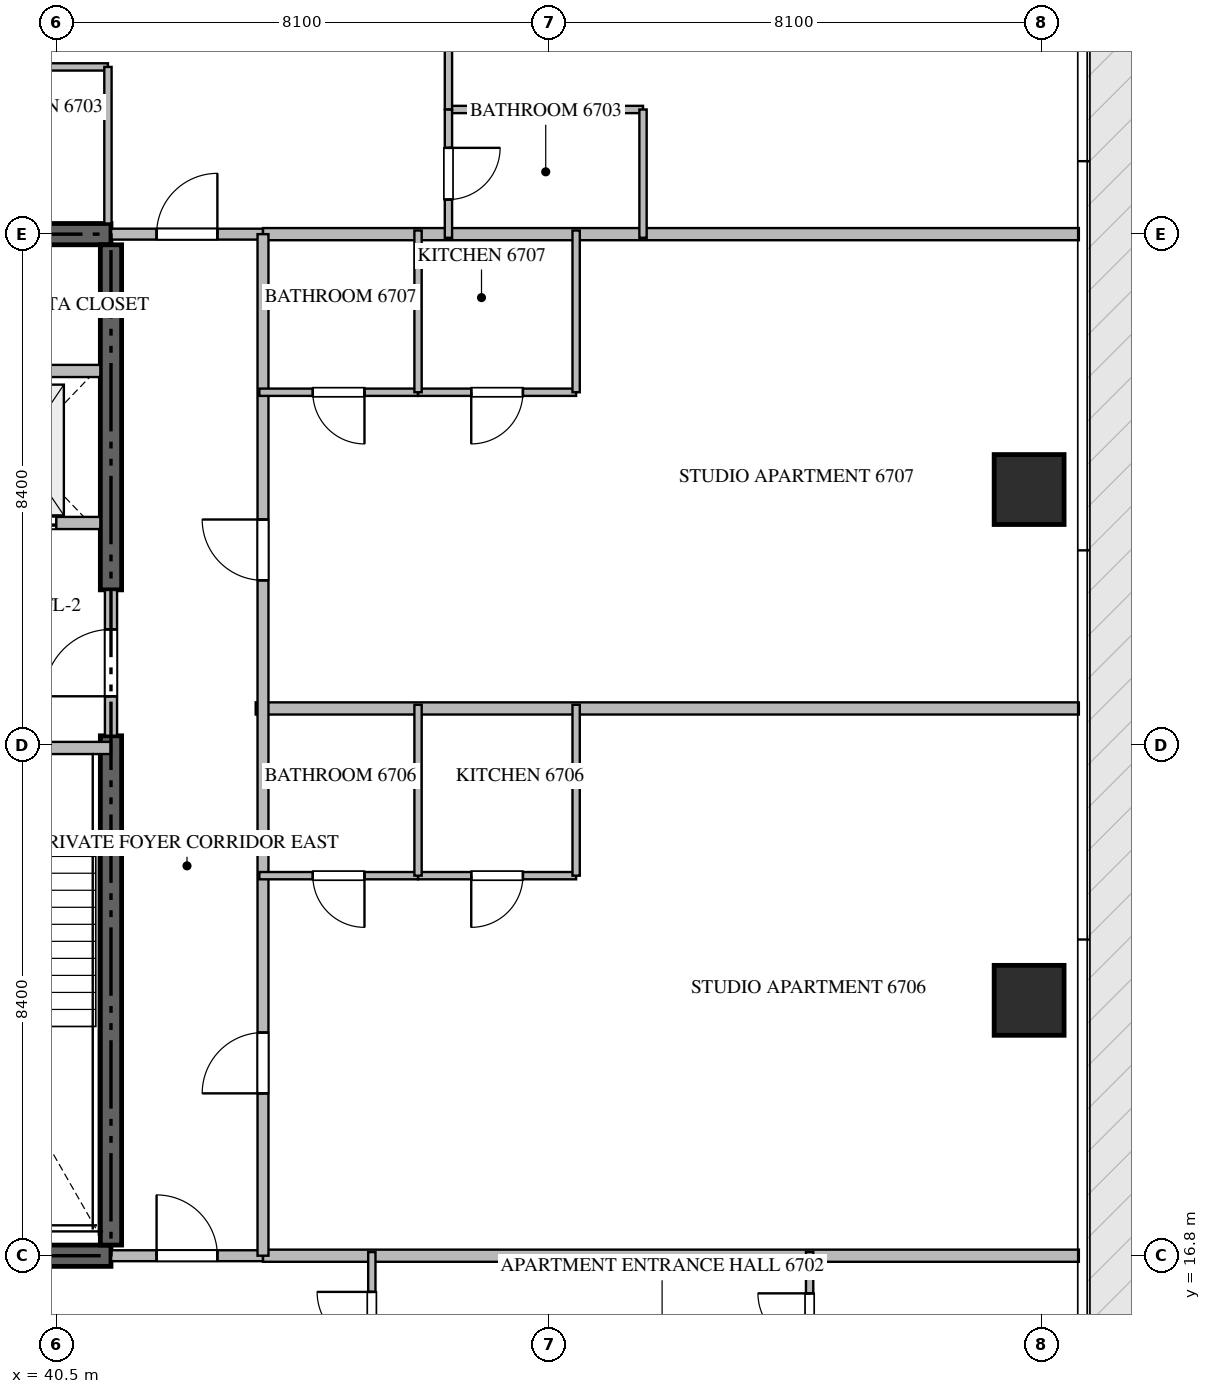
"""IFC4 building model, lengths in metres.
Left out: names, types, materials, properties, quantities, classifications, styles, units other than length and angle.
Written with IfcOpenShell. Run it as: python <this file> out.ifc"""

import sys

from ifc_helpers import new_model, si_unit, direction, frame, frame_2d, origin, origin_2d, place, context, subcontext, project, spatial, rectangle, extrude, source, transform, mapped, element, fill, save


model = new_model("IFC4")
c1 = context("Model", 3, precision=1e-05, world=origin(), true_north=direction((0.0, 1.0)))
c2 = subcontext(c1, "Body", "Model", "MODEL_VIEW")
j1 = project(units=[si_unit("LENGTHUNIT", "METRE"), si_unit("PLANEANGLEUNIT", "RADIAN")], contexts=[c1])
p1 = place(None, origin())
s1 = spatial("IfcSite", under=j1, at=p1, CompositionType="ELEMENT")
p2 = place(p1, origin())
s2 = spatial("IfcBuilding", under=s1, at=p2, CompositionType="ELEMENT")
p3 = place(p2, frame((0.0, 0.0, 268.2)))
s3 = spatial("IfcBuildingStorey", under=s2, at=p3, CompositionType="ELEMENT", Elevation=268.2)
for number, where, z_axis, x_axis in (
    (1, (23.4, 16.8, -0.26), (0.0, 0.0, 1.0), (1.0, 0.0, 0.0)),
    (2, (41.4, 33.6, -0.26), (0.0, 0.0, 1.0), (-1.0, 0.0, 0.0)),
):
    element("IfcWall", number, at=place(p3, frame(where, z_axis=z_axis, x_axis=x_axis)), inside=s3, PredefinedType="SHEAR", context=c2, shape_type="SweptSolid", body=[
        extrude(rectangle(XDim=18.0, YDim=0.35, at=frame_2d((9.0, 0.0))), origin(), (0.0, 0.0, 1.0), 3.848),
    ])
p4 = place(p3, frame((41.4, 16.975, -0.26), z_axis=(0.0, 0.0, 1.0), x_axis=(0.0, 1.0, 0.0)))
e3 = element("IfcWall", 3, at=p4, inside=s3, PredefinedType="SHEAR", context=c2, shape_type="SweptSolid", body=[
    extrude(rectangle(XDim=8.375, YDim=0.35, at=frame_2d((4.188, 0.0))), origin(), (0.0, 0.0, 1.0), 3.848),
])
p5 = place(p3, frame((41.4, 27.75, -0.26), z_axis=(0.0, 0.0, 1.0), x_axis=(0.0, 1.0, 0.0)))
e4 = element("IfcWall", 4, at=p5, inside=s3, PredefinedType="SHEAR", context=c2, shape_type="SweptSolid", body=[
    extrude(rectangle(XDim=5.675, YDim=0.35, at=frame_2d((2.837, 0.0))), origin(), (0.0, 0.0, 1.0), 3.848),
])
m1 = source(origin(), c2, "Body", "SweptSolid", [
    extrude(rectangle(XDim=1.15, YDim=1.15, at=origin_2d()), origin(), (0.0, 0.0, 1.0), 3.85),
])
for number, where, z_axis, x_axis in (
    (5, (56.5, 21.0, -0.26), (0.0, 0.0, 1.0), (1.0, 0.0, 0.0)),
    (6, (56.5, 29.4, -0.26), (0.0, 0.0, 1.0), (1.0, 0.0, 0.0)),
):
    element("IfcColumn", number, at=place(p3, frame(where, z_axis=z_axis, x_axis=x_axis)), inside=s3, PredefinedType="COLUMN", context=c2, shape_type="MappedRepresentation", body=[
        mapped(m1, transform((0.0, 0.0, 0.0), scale=1.0)),
    ])
p6 = place(p3, frame((36.95, 25.15, 0.0), z_axis=(0.0, 0.0, 1.0), x_axis=(1.0, 0.0, 0.0)))
e7 = element("IfcWall", 7, at=p6, inside=s3, PredefinedType="STANDARD", context=c2, shape_type="SweptSolid", body=[
    extrude(rectangle(XDim=4.45, YDim=0.2, at=frame_2d((2.225, 0.0))), origin(), (0.0, 0.0, 1.0), 3.59),
])
p7 = place(p6, frame((1.65, 0.0, 0.0)))
e8 = element("IfcOpeningElement", 8, at=p7, cuts=e7, PredefinedType="OPENING", context=c2, shape_type="SweptSolid", body=[
    extrude(rectangle(XDim=1.1, YDim=2.15, at=frame_2d((0.55, 1.075))), frame((0.0, 0.11, 0.0), z_axis=(0.0, -1.0, 0.0), x_axis=(1.0, 0.0, 0.0)), (0.0, 0.0, 1.0), 0.22),
])
p8 = place(p3, frame((38.75, 28.85, 0.0), z_axis=(0.0, 0.0, 1.0), x_axis=(1.0, 0.0, 0.0)))
e9 = element("IfcWall", 9, at=p8, inside=s3, PredefinedType="STANDARD", context=c2, shape_type="SweptSolid", body=[
    extrude(rectangle(XDim=2.475, YDim=0.2, at=frame_2d((1.238, 0.0))), origin(), (0.0, 0.0, 1.0), 3.59),
])
p9 = place(p8, frame((0.55, 0.0, 0.0)))
e10 = element("IfcOpeningElement", 10, at=p9, cuts=e9, PredefinedType="OPENING", context=c2, shape_type="SweptSolid", body=[
    extrude(rectangle(XDim=1.2, YDim=2.2, at=frame_2d((0.6, 1.1))), frame((0.0, 0.11, 0.0), z_axis=(0.0, -1.0, 0.0), x_axis=(1.0, 0.0, 0.0)), (0.0, 0.0, 1.0), 0.22),
])
p10 = place(p3, frame((38.75, 31.35, 0.0), z_axis=(0.0, 0.0, 1.0), x_axis=(1.0, 0.0, 0.0)))
e11 = element("IfcWall", 11, at=p10, inside=s3, PredefinedType="STANDARD", context=c2, shape_type="SweptSolid", body=[
    extrude(rectangle(XDim=2.475, YDim=0.2, at=frame_2d((1.238, 0.0))), origin(), (0.0, 0.0, 1.0), 3.59),
])
p11 = place(p3, frame((41.4, 25.352, 0.0), z_axis=(0.0, 0.0, 1.0), x_axis=(0.0, 1.0, 0.0)))
e12 = element("IfcWall", 12, at=p11, inside=s3, PredefinedType="STANDARD", context=c2, shape_type="SweptSolid", body=[
    extrude(rectangle(XDim=2.396, YDim=0.2, at=frame_2d((1.198, 0.0))), origin(), (0.0, 0.0, 1.0), 3.59),
])
p12 = place(p11, frame((0.648, 0.0, 0.0)))
e13 = element("IfcOpeningElement", 13, at=p12, cuts=e12, PredefinedType="OPENING", context=c2, shape_type="SweptSolid", body=[
    extrude(rectangle(XDim=1.1, YDim=2.15, at=frame_2d((0.55, 1.075))), frame((0.0, 0.11, 0.0), z_axis=(0.0, -1.0, 0.0), x_axis=(1.0, 0.0, 0.0)), (0.0, 0.0, 1.0), 0.22),
])
p13 = place(p3, frame((43.78, 25.8, 0.0), z_axis=(0.0, 0.0, 1.0), x_axis=(1.0, 0.0, 0.0)))
e14 = element("IfcWall", 14, at=p13, inside=s3, PredefinedType="PARTITIONING", context=c2, shape_type="SweptSolid", body=[
    extrude(rectangle(XDim=13.538, YDim=0.2, at=frame_2d((6.769, 0.0))), origin(), (0.0, 0.0, 1.0), 3.59),
])
for number, where, z_axis, x_axis in (
    (15, (43.9, 16.8, 0.0), (0.0, 0.0, 1.0), (1.0, 0.0, 0.0)),
    (16, (43.9, 33.6, 0.0), (0.0, 0.0, 1.0), (1.0, 0.0, 0.0)),
):
    element("IfcWall", number, at=place(p3, frame(where, z_axis=z_axis, x_axis=x_axis)), inside=s3, PredefinedType="PARTITIONING", context=c2, shape_type="SweptSolid", body=[
        extrude(rectangle(XDim=13.418, YDim=0.2, at=frame_2d((6.709, 0.0))), origin(), (0.0, 0.0, 1.0), 3.59),
    ])
p14 = place(p3, frame((41.402, 16.8, 0.0), z_axis=(0.0, 0.0, 1.0), x_axis=(1.0, 0.0, 0.0)))
e17 = element("IfcWall", 17, at=p14, inside=s3, PredefinedType="PARTITIONING", context=c2, shape_type="SweptSolid", body=[
    extrude(rectangle(XDim=2.496, YDim=0.18, at=frame_2d((1.248, 0.0))), origin(), (0.0, 0.0, 1.0), 3.59),
])
p15 = place(p14, frame((0.748, 0.0, 0.0)))
e18 = element("IfcOpeningElement", 18, at=p15, cuts=e17, PredefinedType="OPENING", context=c2, shape_type="SweptSolid", body=[
    extrude(rectangle(XDim=1.0, YDim=2.15, at=frame_2d((0.5, 1.075))), frame((0.0, 0.1, 0.0), z_axis=(0.0, -1.0, 0.0), x_axis=(1.0, 0.0, 0.0)), (0.0, 0.0, 1.0), 0.2),
])
p16 = place(p3, frame((41.402, 33.6, 0.0), z_axis=(0.0, 0.0, 1.0), x_axis=(1.0, 0.0, 0.0)))
e19 = element("IfcWall", 19, at=p16, inside=s3, PredefinedType="PARTITIONING", context=c2, shape_type="SweptSolid", body=[
    extrude(rectangle(XDim=2.496, YDim=0.18, at=frame_2d((1.248, 0.0))), origin(), (0.0, 0.0, 1.0), 3.59),
])
p17 = place(p16, frame((0.748, 0.0, 0.0)))
e20 = element("IfcOpeningElement", 20, at=p17, cuts=e19, PredefinedType="OPENING", context=c2, shape_type="SweptSolid", body=[
    extrude(rectangle(XDim=1.0, YDim=2.15, at=frame_2d((0.5, 1.075))), frame((0.0, 0.1, 0.0), z_axis=(0.0, -1.0, 0.0), x_axis=(1.0, 0.0, 0.0)), (0.0, 0.0, 1.0), 0.2),
])
p18 = place(p3, frame((43.9, 16.8, 0.0), z_axis=(0.0, 0.0, 1.0), x_axis=(0.0, 1.0, 0.0)))
e21 = element("IfcWall", 21, at=p18, inside=s3, PredefinedType="PARTITIONING", context=c2, shape_type="SweptSolid", body=[
    extrude(rectangle(XDim=16.8, YDim=0.18, at=frame_2d((8.4, 0.0))), origin(), (0.0, 0.0, 1.0), 3.59),
])
p19 = place(p18, frame((2.67, 0.0, 0.0)))
e22 = element("IfcOpeningElement", 22, at=p19, cuts=e21, PredefinedType="OPENING", context=c2, shape_type="SweptSolid", body=[
    extrude(rectangle(XDim=1.0, YDim=2.15, at=frame_2d((0.5, 1.075))), frame((0.0, 0.1, 0.0), z_axis=(0.0, -1.0, 0.0), x_axis=(1.0, 0.0, 0.0)), (0.0, 0.0, 1.0), 0.2),
])
p20 = place(p18, frame((11.107, 0.0, 0.0)))
e23 = element("IfcOpeningElement", 23, at=p20, cuts=e21, PredefinedType="OPENING", context=c2, shape_type="SweptSolid", body=[
    extrude(rectangle(XDim=1.0, YDim=2.15, at=frame_2d((0.5, 1.075))), frame((0.0, 0.1, 0.0), z_axis=(0.0, -1.0, 0.0), x_axis=(1.0, 0.0, 0.0)), (0.0, 0.0, 1.0), 0.2),
])
p21 = place(p3, frame((45.69, 14.65, 0.0), z_axis=(0.0, 0.0, 1.0), x_axis=(0.0, 1.0, 0.0)))
e24 = element("IfcWall", 24, at=p21, inside=s3, PredefinedType="PARTITIONING", context=c2, shape_type="SweptSolid", body=[
    extrude(rectangle(XDim=2.21, YDim=0.12, at=frame_2d((1.105, 0.0))), origin(), (0.0, 0.0, 1.0), 3.59),
])
p22 = place(p21, frame((0.655, 0.0, 0.0)))
e25 = element("IfcOpeningElement", 25, at=p22, cuts=e24, PredefinedType="OPENING", context=c2, shape_type="SweptSolid", body=[
    extrude(rectangle(XDim=0.9, YDim=2.1, at=frame_2d((0.45, 1.05))), frame((0.0, 0.07, 0.0), z_axis=(0.0, -1.0, 0.0), x_axis=(1.0, 0.0, 0.0)), (0.0, 0.0, 1.0), 0.14),
])
p23 = place(p3, frame((52.89, 14.652, 0.0), z_axis=(0.0, 0.0, 1.0), x_axis=(0.0, 1.0, 0.0)))
e26 = element("IfcWall", 26, at=p23, inside=s3, PredefinedType="PARTITIONING", context=c2, shape_type="SweptSolid", body=[
    extrude(rectangle(XDim=2.208, YDim=0.12, at=frame_2d((1.104, 0.0))), origin(), (0.0, 0.0, 1.0), 3.59),
])
p24 = place(p23, frame((0.679, 0.0, 0.0)))
e27 = element("IfcOpeningElement", 27, at=p24, cuts=e26, PredefinedType="OPENING", context=c2, shape_type="SweptSolid", body=[
    extrude(rectangle(XDim=0.85, YDim=2.1, at=frame_2d((0.425, 1.05))), frame((0.0, 0.07, 0.0), z_axis=(0.0, -1.0, 0.0), x_axis=(1.0, 0.0, 0.0)), (0.0, 0.0, 1.0), 0.14),
])
p25 = place(p3, frame((38.5, 36.35, 0.0), z_axis=(0.0, 0.0, 1.0), x_axis=(1.0, 0.0, 0.0)))
e28 = element("IfcWall", 28, at=p25, inside=s3, PredefinedType="PARTITIONING", context=c2, shape_type="SweptSolid", body=[
    extrude(rectangle(XDim=2.85, YDim=0.12, at=frame_2d((1.425, 0.0))), origin(), (0.0, 0.0, 1.0), 3.59),
])
p26 = place(p25, frame((1.0, 0.0, 0.0)))
e29 = element("IfcOpeningElement", 29, at=p26, cuts=e28, PredefinedType="OPENING", context=c2, shape_type="SweptSolid", body=[
    extrude(rectangle(XDim=0.85, YDim=2.1, at=frame_2d((0.425, 1.05))), frame((0.0, 0.07, 0.0), z_axis=(0.0, -1.0, 0.0), x_axis=(1.0, 0.0, 0.0)), (0.0, 0.0, 1.0), 0.14),
])
p27 = place(p3, frame((41.35, 36.35, 0.0), z_axis=(0.0, 0.0, 1.0), x_axis=(0.0, -1.0, 0.0)))
e30 = element("IfcWall", 30, at=p27, inside=s3, PredefinedType="PARTITIONING", context=c2, shape_type="SweptSolid", body=[
    extrude(rectangle(XDim=2.575, YDim=0.12, at=frame_2d((1.288, 0.0))), origin(), (0.0, 0.0, 1.0), 3.59),
])
p28 = place(p3, frame((46.95, 35.65, 0.0), z_axis=(0.0, 0.0, 1.0), x_axis=(1.0, 0.0, 0.0)))
e31 = element("IfcWall", 31, at=p28, inside=s3, PredefinedType="PARTITIONING", context=c2, shape_type="SweptSolid", body=[
    extrude(rectangle(XDim=3.2, YDim=0.12, at=frame_2d((1.6, 0.0))), origin(), (0.0, 0.0, 1.0), 3.59),
])
p29 = place(p3, frame((50.15, 35.65, 0.0), z_axis=(0.0, 0.0, 1.0), x_axis=(0.0, -1.0, 0.0)))
e32 = element("IfcWall", 32, at=p29, inside=s3, PredefinedType="PARTITIONING", context=c2, shape_type="SweptSolid", body=[
    extrude(rectangle(XDim=2.11, YDim=0.12, at=frame_2d((1.055, 0.0))), origin(), (0.0, 0.0, 1.0), 3.59),
])
p30 = place(p3, frame((46.95, 41.73, 0.0), z_axis=(0.0, 0.0, 1.0), x_axis=(0.0, -1.0, 0.0)))
e33 = element("IfcWall", 33, at=p30, inside=s3, PredefinedType="PARTITIONING", context=c2, shape_type="SweptSolid", body=[
    extrude(rectangle(XDim=6.08, YDim=0.12, at=frame_2d((3.04, 0.0))), origin(), (0.0, 0.0, 1.0), 3.59),
])
p31 = place(p30, frame((2.615, 0.0, 0.0)))
e34 = element("IfcOpeningElement", 34, at=p31, cuts=e33, PredefinedType="OPENING", context=c2, shape_type="SweptSolid", body=[
    extrude(rectangle(XDim=0.85, YDim=2.1, at=frame_2d((0.425, 1.05))), frame((0.0, 0.07, 0.0), z_axis=(0.0, -1.0, 0.0), x_axis=(1.0, 0.0, 0.0)), (0.0, 0.0, 1.0), 0.14),
])
p32 = place(p3, frame((46.95, 35.648, 0.0), z_axis=(0.0, 0.0, 1.0), x_axis=(0.0, -1.0, 0.0)))
e35 = element("IfcWall", 35, at=p32, inside=s3, PredefinedType="PARTITIONING", context=c2, shape_type="SweptSolid", body=[
    extrude(rectangle(XDim=2.108, YDim=0.12, at=frame_2d((1.054, 0.0))), origin(), (0.0, 0.0, 1.0), 3.59),
])
p33 = place(p32, frame((0.629, 0.0, 0.0)))
e36 = element("IfcOpeningElement", 36, at=p33, cuts=e35, PredefinedType="OPENING", context=c2, shape_type="SweptSolid", body=[
    extrude(rectangle(XDim=0.85, YDim=2.1, at=frame_2d((0.425, 1.05))), frame((0.0, 0.07, 0.0), z_axis=(0.0, -1.0, 0.0), x_axis=(1.0, 0.0, 0.0)), (0.0, 0.0, 1.0), 0.14),
])
p34 = place(p3, frame((49.05, 23.05, 0.0), z_axis=(0.0, 0.0, 1.0), x_axis=(-1.0, 0.0, 0.0)))
e37 = element("IfcWall", 37, at=p34, inside=s3, PredefinedType="PARTITIONING", context=c2, shape_type="SweptSolid", body=[
    extrude(rectangle(XDim=2.6, YDim=0.12, at=frame_2d((1.3, 0.0))), origin(), (0.0, 0.0, 1.0), 3.59),
])
p35 = place(p34, frame((0.875, 0.0, 0.0)))
e38 = element("IfcOpeningElement", 38, at=p35, cuts=e37, PredefinedType="OPENING", context=c2, shape_type="SweptSolid", body=[
    extrude(rectangle(XDim=0.85, YDim=2.1, at=frame_2d((0.425, 1.05))), frame((0.0, 0.07, 0.0), z_axis=(0.0, -1.0, 0.0), x_axis=(1.0, 0.0, 0.0)), (0.0, 0.0, 1.0), 0.14),
])
p36 = place(p3, frame((46.448, 23.05, 0.0), z_axis=(0.0, 0.0, 1.0), x_axis=(-1.0, 0.0, 0.0)))
e39 = element("IfcWall", 39, at=p36, inside=s3, PredefinedType="PARTITIONING", context=c2, shape_type="SweptSolid", body=[
    extrude(rectangle(XDim=2.608, YDim=0.12, at=frame_2d((1.304, 0.0))), origin(), (0.0, 0.0, 1.0), 3.59),
])
p37 = place(p36, frame((0.879, 0.0, 0.0)))
e40 = element("IfcOpeningElement", 40, at=p37, cuts=e39, PredefinedType="OPENING", context=c2, shape_type="SweptSolid", body=[
    extrude(rectangle(XDim=0.85, YDim=2.1, at=frame_2d((0.425, 1.05))), frame((0.0, 0.07, 0.0), z_axis=(0.0, -1.0, 0.0), x_axis=(1.0, 0.0, 0.0)), (0.0, 0.0, 1.0), 0.14),
])
for number, where, z_axis, x_axis in (
    (41, (46.45, 23.05, 0.0), (0.0, 0.0, 1.0), (0.0, 1.0, 0.0)),
    (42, (49.05, 23.05, 0.0), (0.0, 0.0, 1.0), (0.0, 1.0, 0.0)),
):
    element("IfcWall", number, at=place(p3, frame(where, z_axis=z_axis, x_axis=x_axis)), inside=s3, PredefinedType="PARTITIONING", context=c2, shape_type="SweptSolid", body=[
        extrude(rectangle(XDim=2.81, YDim=0.12, at=frame_2d((1.405, 0.0))), origin(), (0.0, 0.0, 1.0), 3.59),
    ])
p38 = place(p3, frame((49.05, 31.0, 0.0), z_axis=(0.0, 0.0, 1.0), x_axis=(-1.0, 0.0, 0.0)))
e43 = element("IfcWall", 43, at=p38, inside=s3, PredefinedType="PARTITIONING", context=c2, shape_type="SweptSolid", body=[
    extrude(rectangle(XDim=2.6, YDim=0.12, at=frame_2d((1.3, 0.0))), origin(), (0.0, 0.0, 1.0), 3.59),
])
p39 = place(p38, frame((0.875, 0.0, 0.0)))
e44 = element("IfcOpeningElement", 44, at=p39, cuts=e43, PredefinedType="OPENING", context=c2, shape_type="SweptSolid", body=[
    extrude(rectangle(XDim=0.85, YDim=2.1, at=frame_2d((0.425, 1.05))), frame((0.0, 0.07, 0.0), z_axis=(0.0, -1.0, 0.0), x_axis=(1.0, 0.0, 0.0)), (0.0, 0.0, 1.0), 0.14),
])
p40 = place(p3, frame((46.448, 31.0, 0.0), z_axis=(0.0, 0.0, 1.0), x_axis=(-1.0, 0.0, 0.0)))
e45 = element("IfcWall", 45, at=p40, inside=s3, PredefinedType="PARTITIONING", context=c2, shape_type="SweptSolid", body=[
    extrude(rectangle(XDim=2.608, YDim=0.12, at=frame_2d((1.304, 0.0))), origin(), (0.0, 0.0, 1.0), 3.59),
])
p41 = place(p40, frame((0.879, 0.0, 0.0)))
e46 = element("IfcOpeningElement", 46, at=p41, cuts=e45, PredefinedType="OPENING", context=c2, shape_type="SweptSolid", body=[
    extrude(rectangle(XDim=0.85, YDim=2.1, at=frame_2d((0.425, 1.05))), frame((0.0, 0.07, 0.0), z_axis=(0.0, -1.0, 0.0), x_axis=(1.0, 0.0, 0.0)), (0.0, 0.0, 1.0), 0.14),
])
for number, where, z_axis, x_axis in (
    (47, (46.45, 31.0, 0.0), (0.0, 0.0, 1.0), (0.0, 1.0, 0.0)),
    (48, (49.05, 31.0, 0.0), (0.0, 0.0, 1.0), (0.0, 1.0, 0.0)),
):
    element("IfcWall", number, at=place(p3, frame(where, z_axis=z_axis, x_axis=x_axis)), inside=s3, PredefinedType="PARTITIONING", context=c2, shape_type="SweptSolid", body=[
        extrude(rectangle(XDim=2.66, YDim=0.12, at=frame_2d((1.33, 0.0))), origin(), (0.0, 0.0, 1.0), 3.59),
    ])
m2 = source(origin(), c2, "Body", "SweptSolid", [
    extrude(rectangle(XDim=1.2, YDim=2.2, at=frame_2d((0.6, 1.1))), frame((0.0, 0.025, 0.0), z_axis=(0.0, -1.0, 0.0), x_axis=(1.0, 0.0, 0.0)), (0.0, 0.0, 1.0), 0.05),
])
p42 = place(p9, origin())
e49 = element("IfcDoor", 49, at=p42, inside=s3, OperationType="DOUBLE_DOOR_SLIDING", PredefinedType="DOOR", context=c2, shape_type="MappedRepresentation", body=[
    mapped(m2, transform((0.0, 0.0, 0.0), scale=1.0)),
])
fill(e10, e49)
m3 = source(origin(), c2, "Body", "SweptSolid", [
    extrude(rectangle(XDim=1.1, YDim=2.15, at=frame_2d((0.55, 1.075))), frame((0.0, 0.025, 0.0), z_axis=(0.0, -1.0, 0.0), x_axis=(1.0, 0.0, 0.0)), (0.0, 0.0, 1.0), 0.05),
])
p43 = place(p12, origin())
e50 = element("IfcDoor", 50, at=p43, inside=s3, OperationType="SINGLE_SWING_LEFT", PredefinedType="DOOR", context=c2, shape_type="MappedRepresentation", body=[
    mapped(m3, transform((0.0, 0.0, 0.0), scale=1.0)),
])
fill(e13, e50)
m4 = source(origin(), c2, "Body", "SweptSolid", [
    extrude(rectangle(XDim=1.0, YDim=2.15, at=frame_2d((0.5, 1.075))), frame((0.0, 0.025, 0.0), z_axis=(0.0, -1.0, 0.0), x_axis=(1.0, 0.0, 0.0)), (0.0, 0.0, 1.0), 0.05),
])
p44 = place(p15, origin())
e51 = element("IfcDoor", 51, at=p44, inside=s3, OperationType="SINGLE_SWING_LEFT", PredefinedType="DOOR", context=c2, shape_type="MappedRepresentation", body=[
    mapped(m4, transform((0.0, 0.0, 0.0), scale=1.0)),
])
fill(e18, e51)
p45 = place(p17, origin())
e52 = element("IfcDoor", 52, at=p45, inside=s3, OperationType="SINGLE_SWING_RIGHT", PredefinedType="DOOR", context=c2, shape_type="MappedRepresentation", body=[
    mapped(m4, transform((0.0, 0.0, 0.0), scale=1.0)),
])
fill(e20, e52)
p46 = place(p19, origin())
e53 = element("IfcDoor", 53, at=p46, inside=s3, OperationType="SINGLE_SWING_LEFT", PredefinedType="DOOR", context=c2, shape_type="MappedRepresentation", body=[
    mapped(m4, transform((0.0, 0.0, 0.0), scale=1.0)),
])
fill(e22, e53)
p47 = place(p20, origin())
e54 = element("IfcDoor", 54, at=p47, inside=s3, OperationType="SINGLE_SWING_RIGHT", PredefinedType="DOOR", context=c2, shape_type="MappedRepresentation", body=[
    mapped(m4, transform((0.0, 0.0, 0.0), scale=1.0)),
])
fill(e23, e54)
m5 = source(origin(), c2, "Body", "SweptSolid", [
    extrude(rectangle(XDim=0.9, YDim=2.1, at=frame_2d((0.45, 1.05))), frame((0.0, 0.025, 0.0), z_axis=(0.0, -1.0, 0.0), x_axis=(1.0, 0.0, 0.0)), (0.0, 0.0, 1.0), 0.05),
])
p48 = place(p22, origin())
e55 = element("IfcDoor", 55, at=p48, inside=s3, OperationType="SINGLE_SWING_RIGHT", PredefinedType="DOOR", context=c2, shape_type="MappedRepresentation", body=[
    mapped(m5, transform((0.0, 0.0, 0.0), scale=1.0)),
])
fill(e25, e55)
m6 = source(origin(), c2, "Body", "SweptSolid", [
    extrude(rectangle(XDim=0.85, YDim=2.1, at=frame_2d((0.425, 1.05))), frame((0.0, 0.025, 0.0), z_axis=(0.0, -1.0, 0.0), x_axis=(1.0, 0.0, 0.0)), (0.0, 0.0, 1.0), 0.05),
])
p49 = place(p24, origin())
e56 = element("IfcDoor", 56, at=p49, inside=s3, OperationType="SINGLE_SWING_RIGHT", PredefinedType="DOOR", context=c2, shape_type="MappedRepresentation", body=[
    mapped(m6, transform((0.0, 0.0, 0.0), scale=1.0)),
])
fill(e27, e56)
p50 = place(p33, origin())
e57 = element("IfcDoor", 57, at=p50, inside=s3, OperationType="SINGLE_SWING_LEFT", PredefinedType="DOOR", context=c2, shape_type="MappedRepresentation", body=[
    mapped(m6, transform((0.0, 0.0, 0.0), scale=1.0)),
])
fill(e36, e57)
p51 = place(p35, origin())
e58 = element("IfcDoor", 58, at=p51, inside=s3, OperationType="SINGLE_SWING_RIGHT", PredefinedType="DOOR", context=c2, shape_type="MappedRepresentation", body=[
    mapped(m6, transform((0.0, 0.0, 0.0), scale=1.0)),
])
fill(e38, e58)
p52 = place(p37, origin())
e59 = element("IfcDoor", 59, at=p52, inside=s3, OperationType="SINGLE_SWING_LEFT", PredefinedType="DOOR", context=c2, shape_type="MappedRepresentation", body=[
    mapped(m6, transform((0.0, 0.0, 0.0), scale=1.0)),
])
fill(e40, e59)
p53 = place(p39, origin())
e60 = element("IfcDoor", 60, at=p53, inside=s3, OperationType="SINGLE_SWING_RIGHT", PredefinedType="DOOR", context=c2, shape_type="MappedRepresentation", body=[
    mapped(m6, transform((0.0, 0.0, 0.0), scale=1.0)),
])
fill(e44, e60)
p54 = place(p41, origin())
e61 = element("IfcDoor", 61, at=p54, inside=s3, OperationType="SINGLE_SWING_LEFT", PredefinedType="DOOR", context=c2, shape_type="MappedRepresentation", body=[
    mapped(m6, transform((0.0, 0.0, 0.0), scale=1.0)),
])
fill(e46, e61)
save(model, sys.argv[1])
